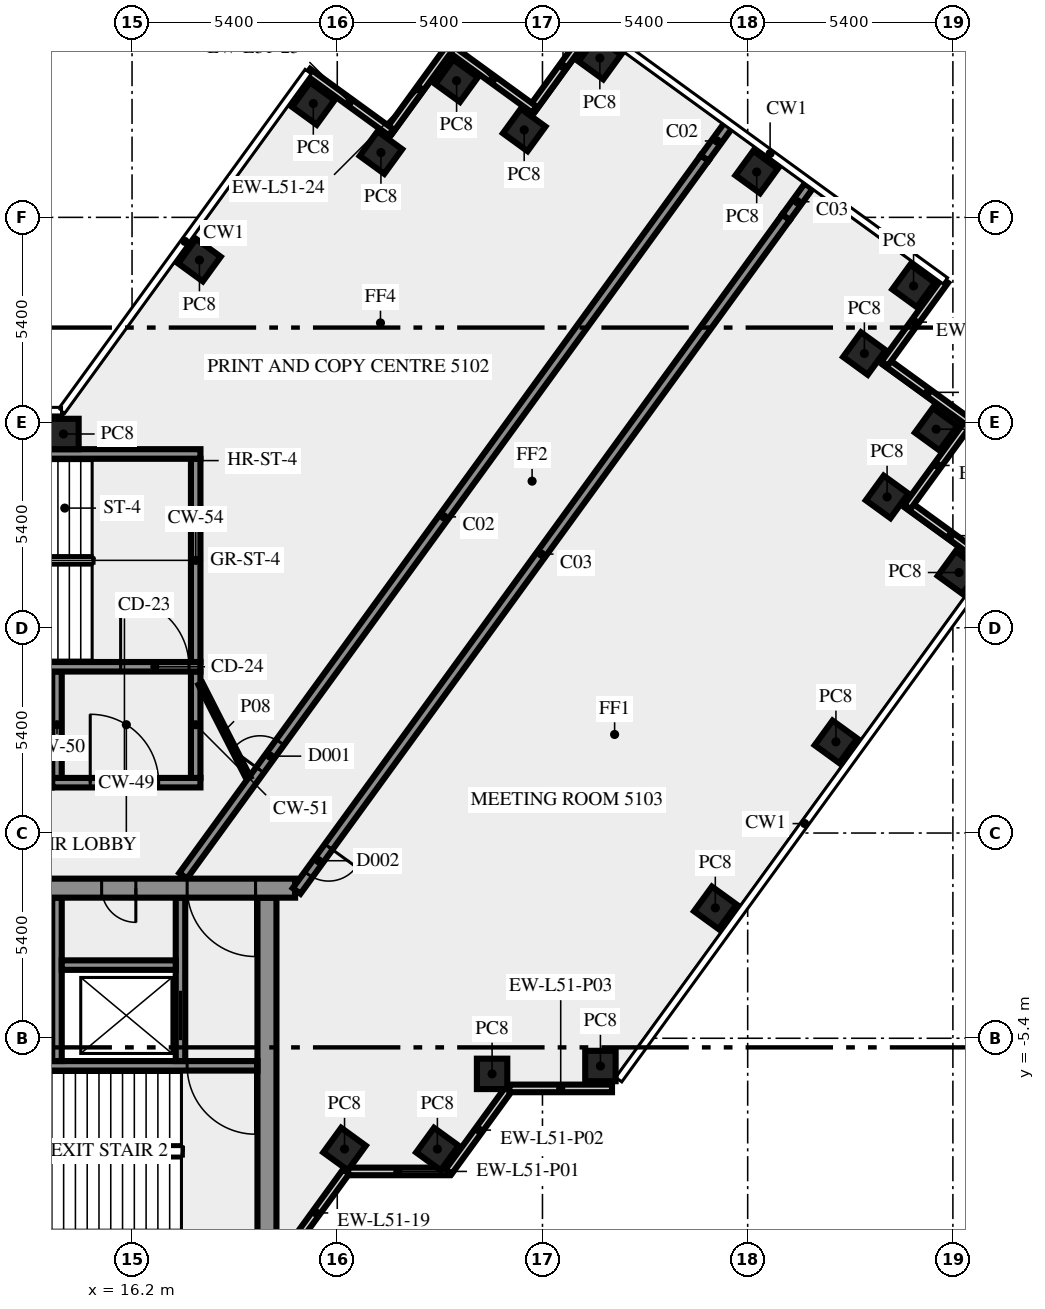
"""IFC4 building model, lengths in metres.
Left out: names, types, materials, properties, quantities, classifications, styles, units other than length and angle.
Written with IfcOpenShell. Run it as: python <this file> out.ifc"""

import sys

from ifc_helpers import new_model, si_unit, direction, frame, frame_2d, origin, origin_2d, place, context, subcontext, project, spatial, rectangle, extrude, element, fill, save


model = new_model("IFC4")
c1 = context("Model", 3, precision=1e-05, world=origin(), true_north=direction((0.0, 1.0)))
c2 = subcontext(c1, "Body", "Model", "MODEL_VIEW")
j1 = project(units=[si_unit("LENGTHUNIT", "METRE"), si_unit("PLANEANGLEUNIT", "RADIAN")], contexts=[c1])
p1 = place(None, origin())
s1 = spatial("IfcSite", under=j1, at=p1, CompositionType="ELEMENT")
p2 = place(p1, origin())
s2 = spatial("IfcBuilding", under=s1, at=p2, CompositionType="ELEMENT")
p3 = place(p2, frame((0.0, 0.0, 218.0)))
s3 = spatial("IfcBuildingStorey", under=s2, at=p3, CompositionType="ELEMENT", Elevation=218.0)
for number, where, z_axis, x_axis in (
    (1, (21.792, -8.315, 0.0), (0.0, 0.0, 1.0), (0.588, 0.809, 0.0)),
    (2, (24.235, -8.315, 0.0), (0.0, 0.0, 1.0), (0.588, 0.809, 0.0)),
    (3, (25.674, -6.337, 0.0), (0.0, 0.0, 1.0), (1.0, 0.0, 0.0)),
    (4, (28.525, -6.13, 0.0), (0.0, 0.0, 1.0), (1.0, 0.0, 0.0)),
    (5, (31.548, -1.969, 0.0), (0.0, 0.0, 1.0), (0.588, 0.809, 0.0)),
    (6, (34.722, 2.4, 0.0), (0.0, 0.0, 1.0), (0.588, 0.809, 0.0)),
    (7, (37.96, 6.855, 0.0), (0.0, 0.0, 1.0), (0.588, 0.809, 0.0)),
    (8, (36.068, 8.844, 0.0), (0.0, 0.0, 1.0), (0.588, 0.809, 0.0)),
    (9, (37.36, 10.625, 0.0), (0.0, 0.0, 1.0), (0.588, 0.809, 0.0)),
    (10, (35.471, 12.616, 0.0), (0.0, 0.0, 1.0), (-0.809, 0.588, 0.0)),
    (11, (36.765, 14.395, 0.0), (0.0, 0.0, 1.0), (-0.809, 0.588, 0.0)),
    (12, (32.637, 17.393, 0.0), (0.0, 0.0, 1.0), (-0.809, 0.588, 0.0)),
    (13, (28.51, 20.39, 0.0), (0.0, 0.0, 1.0), (-0.588, -0.809, 0.0)),
    (14, (26.519, 18.5, 0.0), (0.0, 0.0, 1.0), (-0.809, 0.588, 0.0)),
    (15, (24.74, 19.795, 0.0), (0.0, 0.0, 1.0), (-0.588, -0.809, 0.0)),
    (16, (22.749, 17.904, 0.0), (0.0, 0.0, 1.0), (-0.588, -0.809, 0.0)),
    (17, (20.97, 19.195, 0.0), (0.0, 0.0, 1.0), (-0.588, -0.809, 0.0)),
    (18, (17.974, 15.075, 0.0), (0.0, 0.0, 1.0), (-0.588, -0.809, 0.0)),
    (19, (14.395, 10.5, 0.0), (0.0, 0.0, 1.0), (-1.0, 0.0, 0.0)),
):
    element("IfcColumn", number, at=place(p3, frame(where, z_axis=z_axis, x_axis=x_axis)), inside=s3, PredefinedType="COLUMN", context=c2, shape_type="SweptSolid", body=[
        extrude(rectangle(XDim=0.8, YDim=0.8, at=origin_2d()), origin(), (0.0, 0.0, 1.0), 3.65),
    ])
p4 = place(p3, frame((21.843, -8.904, 0.0), z_axis=(0.0, 0.0, 1.0), x_axis=(1.0, 0.0, 0.0)))
e20 = element("IfcWall", 20, at=p4, inside=s3, PredefinedType="SOLIDWALL", context=c2, shape_type="SweptSolid", body=[
    extrude(rectangle(XDim=2.7, YDim=0.2, at=frame_2d((1.35, 0.0))), origin(), (0.0, 0.0, 1.0), 3.65),
])
p5 = place(p3, frame((24.533, -8.909, 0.0), z_axis=(0.0, 0.0, 1.0), x_axis=(0.587720002413, 0.809064397168, 0.0)))
e21 = element("IfcWall", 21, at=p5, inside=s3, PredefinedType="SOLIDWALL", context=c2, shape_type="SweptSolid", body=[
    extrude(rectangle(XDim=2.7, YDim=0.2, at=frame_2d((1.35, 0.0))), origin(), (0.0, 0.0, 1.0), 3.65),
])
for number, where, z_axis, x_axis in (
    (22, (26.13, -6.719, 0.0), (0.0, 0.0, 1.0), (1.0, 0.0, 0.0)),
    (23, (38.829, 7.031, 0.0), (0.0, 0.0, 1.0), (-0.809, 0.588, 0.0)),
    (24, (36.602, 8.58, 0.0), (0.0, 0.0, 1.0), (0.588, 0.809, 0.0)),
    (25, (38.231, 10.802, 0.0), (0.0, 0.0, 1.0), (-0.809, 0.588, 0.0)),
):
    element("IfcWall", number, at=place(p3, frame(where, z_axis=z_axis, x_axis=x_axis)), inside=s3, PredefinedType="SOLIDWALL", context=c2, shape_type="SweptSolid", body=[
        extrude(rectangle(XDim=2.7, YDim=0.2, at=frame_2d((1.35, 0.0))), origin(), (0.0, 0.0, 1.0), 3.65),
    ])
p6 = place(p3, frame((20.253, -11.083, 0.0), z_axis=(0.0, 0.0, 1.0), x_axis=(0.587766567315, 0.809030569476, 0.0)))
e26 = element("IfcWall", 26, at=p6, inside=s3, PredefinedType="SOLIDWALL", context=c2, shape_type="SweptSolid", body=[
    extrude(rectangle(XDim=2.688, YDim=0.2, at=frame_2d((1.344, 0.0))), origin(), (0.0, 0.0, 1.0), 3.65),
])
for number, where, z_axis, x_axis in (
    (27, (36.005, 12.352, 0.0), (0.0, 0.0, 1.0), (0.588, 0.809, 0.0)),
    (28, (28.334, 21.262, 0.0), (0.0, 0.0, 1.0), (-0.588, -0.809, 0.0)),
):
    element("IfcWall", number, at=place(p3, frame(where, z_axis=z_axis, x_axis=x_axis)), inside=s3, PredefinedType="SOLIDWALL", context=c2, shape_type="SweptSolid", body=[
        extrude(rectangle(XDim=2.7, YDim=0.2, at=frame_2d((1.35, 0.0))), origin(), (0.0, 0.0, 1.0), 3.65),
    ])
p7 = place(p3, frame((26.785, 19.036, 0.0), z_axis=(0.0, 0.0, 1.0), x_axis=(-0.809064397168, 0.587720002413, 0.0)))
e29 = element("IfcWall", 29, at=p7, inside=s3, PredefinedType="SOLIDWALL", context=c2, shape_type="SweptSolid", body=[
    extrude(rectangle(XDim=2.7, YDim=0.2, at=frame_2d((1.35, 0.0))), origin(), (0.0, 0.0, 1.0), 3.65),
])
for number, where, z_axis, x_axis in (
    (30, (24.563, 20.665, 0.0), (0.0, 0.0, 1.0), (-0.588, -0.809, 0.0)),
    (31, (23.013, 18.438, 0.0), (0.0, 0.0, 1.0), (-0.809, 0.588, 0.0)),
):
    element("IfcWall", number, at=place(p3, frame(where, z_axis=z_axis, x_axis=x_axis)), inside=s3, PredefinedType="SOLIDWALL", context=c2, shape_type="SweptSolid", body=[
        extrude(rectangle(XDim=2.7, YDim=0.2, at=frame_2d((1.35, 0.0))), origin(), (0.0, 0.0, 1.0), 3.65),
    ])
p8 = place(p3, frame((19.75, -10.5, 0.0), z_axis=(0.0, 0.0, 1.0), x_axis=(0.0, 1.0, 0.0)))
e32 = element("IfcWall", 32, at=p8, inside=s3, PredefinedType="SHEAR", context=c2, shape_type="SweptSolid", body=[
    extrude(rectangle(XDim=8.8, YDim=0.5, at=frame_2d((4.4, 0.0))), origin(), (0.0, 0.0, 1.0), 3.65),
])
p9 = place(p3, frame((19.5, -6.125, 0.0), z_axis=(0.0, 0.0, 1.0), x_axis=(-1.0, 0.0, 0.0)))
e33 = element("IfcWall", 33, at=p9, inside=s3, PredefinedType="SHEAR", context=c2, shape_type="SweptSolid", body=[
    extrude(rectangle(XDim=8.05, YDim=0.25, at=frame_2d((4.025, 0.0))), origin(), (0.0, 0.0, 1.0), 3.65),
])
p10 = place(p9, frame((0.05, 0.0, 0.0)))
e34 = element("IfcOpeningElement", 34, at=p10, cuts=e33, PredefinedType="OPENING", context=c2, shape_type="SweptSolid", body=[
    extrude(rectangle(XDim=1.8, YDim=2.1, at=frame_2d((0.9, 1.05))), frame((0.0, 0.135, 0.0), z_axis=(0.0, -1.0, 0.0), x_axis=(1.0, 0.0, 0.0)), (0.0, 0.0, 1.0), 0.27),
])
p11 = place(p3, frame((14.225, -6.0, 0.0), z_axis=(0.0, 0.0, 1.0), x_axis=(0.0, 1.0, 0.0)))
e35 = element("IfcWall", 35, at=p11, inside=s3, PredefinedType="SHEAR", context=c2, shape_type="SweptSolid", body=[
    extrude(rectangle(XDim=4.3, YDim=0.25, at=frame_2d((2.15, 0.0))), origin(), (0.0, 0.0, 1.0), 3.65),
])
p12 = place(p3, frame((17.475, -6.0, 0.0), z_axis=(0.0, 0.0, 1.0), x_axis=(0.0, 1.0, 0.0)))
e36 = element("IfcWall", 36, at=p12, inside=s3, PredefinedType="SHEAR", context=c2, shape_type="SweptSolid", body=[
    extrude(rectangle(XDim=4.3, YDim=0.25, at=frame_2d((2.15, 0.0))), origin(), (0.0, 0.0, 1.0), 3.65),
])
p13 = place(p12, frame((0.55, 0.0, 0.0)))
e37 = element("IfcOpeningElement", 37, at=p13, cuts=e36, PredefinedType="OPENING", context=c2, shape_type="SweptSolid", body=[
    extrude(rectangle(XDim=1.3, YDim=2.1, at=frame_2d((0.65, 1.05))), frame((0.0, 0.135, 0.0), z_axis=(0.0, -1.0, 0.0), x_axis=(1.0, 0.0, 0.0)), (0.0, 0.0, 1.0), 0.27),
])
p14 = place(p3, frame((14.35, -3.475, 0.0), z_axis=(0.0, 0.0, 1.0), x_axis=(1.0, 0.0, 0.0)))
e38 = element("IfcWall", 38, at=p14, inside=s3, PredefinedType="SHEAR", context=c2, shape_type="SweptSolid", body=[
    extrude(rectangle(XDim=3.0, YDim=0.25, at=frame_2d((1.5, 0.0))), origin(), (0.0, 0.0, 1.0), 3.65),
])
p15 = place(p3, frame((20.49, -1.45, 0.0), z_axis=(0.0, 0.0, 1.0), x_axis=(-1.0, 0.0, 0.0)))
e39 = element("IfcWall", 39, at=p15, inside=s3, PredefinedType="SHEAR", context=c2, shape_type="SweptSolid", body=[
    extrude(rectangle(XDim=40.98, YDim=0.5, at=frame_2d((20.49, 0.0))), origin(), (0.0, 0.0, 1.0), 3.65),
])
p16 = place(p15, frame((38.14, 0.0, 0.0)))
e40 = element("IfcOpeningElement", 40, at=p16, cuts=e39, PredefinedType="OPENING", context=c2, shape_type="SweptSolid", body=[
    extrude(rectangle(XDim=1.8, YDim=2.1, at=frame_2d((0.9, 1.05))), frame((0.0, 0.26, 0.0), z_axis=(0.0, -1.0, 0.0), x_axis=(1.0, 0.0, 0.0)), (0.0, 0.0, 1.0), 0.52),
])
p17 = place(p15, frame((36.728, 0.0, 0.0)))
e41 = element("IfcOpeningElement", 41, at=p17, cuts=e39, PredefinedType="OPENING", context=c2, shape_type="SweptSolid", body=[
    extrude(rectangle(XDim=0.8, YDim=2.1, at=frame_2d((0.4, 1.05))), frame((0.0, 0.26, 0.0), z_axis=(0.0, -1.0, 0.0), x_axis=(1.0, 0.0, 0.0)), (0.0, 0.0, 1.0), 0.52),
])
p18 = place(p15, frame((35.153, 0.0, 0.0)))
e42 = element("IfcOpeningElement", 42, at=p18, cuts=e39, PredefinedType="OPENING", context=c2, shape_type="SweptSolid", body=[
    extrude(rectangle(XDim=0.8, YDim=2.1, at=frame_2d((0.4, 1.05))), frame((0.0, 0.26, 0.0), z_axis=(0.0, -1.0, 0.0), x_axis=(1.0, 0.0, 0.0)), (0.0, 0.0, 1.0), 0.52),
])
p19 = place(p15, frame((32.94, 0.0, 0.0)))
e43 = element("IfcOpeningElement", 43, at=p19, cuts=e39, PredefinedType="OPENING", context=c2, shape_type="SweptSolid", body=[
    extrude(rectangle(XDim=0.9, YDim=2.1, at=frame_2d((0.45, 1.05))), frame((0.0, 0.26, 0.0), z_axis=(0.0, -1.0, 0.0), x_axis=(1.0, 0.0, 0.0)), (0.0, 0.0, 1.0), 0.52),
])
p20 = place(p15, frame((30.202, 0.0, 0.0)))
e44 = element("IfcOpeningElement", 44, at=p20, cuts=e39, PredefinedType="OPENING", context=c2, shape_type="SweptSolid", body=[
    extrude(rectangle(XDim=0.9, YDim=2.1, at=frame_2d((0.45, 1.05))), frame((0.0, 0.26, 0.0), z_axis=(0.0, -1.0, 0.0), x_axis=(1.0, 0.0, 0.0)), (0.0, 0.0, 1.0), 0.52),
])
p21 = place(p15, frame((27.74, 0.0, 0.0)))
e45 = element("IfcOpeningElement", 45, at=p21, cuts=e39, PredefinedType="OPENING", context=c2, shape_type="SweptSolid", body=[
    extrude(rectangle(XDim=0.9, YDim=2.1, at=frame_2d((0.45, 1.05))), frame((0.0, 0.26, 0.0), z_axis=(0.0, -1.0, 0.0), x_axis=(1.0, 0.0, 0.0)), (0.0, 0.0, 1.0), 0.52),
])
p22 = place(p15, frame((25.377, 0.0, 0.0)))
e46 = element("IfcOpeningElement", 46, at=p22, cuts=e39, PredefinedType="OPENING", context=c2, shape_type="SweptSolid", body=[
    extrude(rectangle(XDim=0.9, YDim=2.1, at=frame_2d((0.45, 1.05))), frame((0.0, 0.26, 0.0), z_axis=(0.0, -1.0, 0.0), x_axis=(1.0, 0.0, 0.0)), (0.0, 0.0, 1.0), 0.52),
])
p23 = place(p15, frame((20.74, 0.0, 0.0)))
e47 = element("IfcOpeningElement", 47, at=p23, cuts=e39, PredefinedType="OPENING", context=c2, shape_type="SweptSolid", body=[
    extrude(rectangle(XDim=2.0, YDim=2.1, at=frame_2d((1.0, 1.05))), frame((0.0, 0.26, 0.0), z_axis=(0.0, -1.0, 0.0), x_axis=(1.0, 0.0, 0.0)), (0.0, 0.0, 1.0), 0.52),
])
p24 = place(p15, frame((7.14, 0.0, 0.0)))
e48 = element("IfcOpeningElement", 48, at=p24, cuts=e39, PredefinedType="OPENING", context=c2, shape_type="SweptSolid", body=[
    extrude(rectangle(XDim=0.9, YDim=2.1, at=frame_2d((0.45, 1.05))), frame((0.0, 0.26, 0.0), z_axis=(0.0, -1.0, 0.0), x_axis=(1.0, 0.0, 0.0)), (0.0, 0.0, 1.0), 0.52),
])
p25 = place(p15, frame((4.19, 0.0, 0.0)))
e49 = element("IfcOpeningElement", 49, at=p25, cuts=e39, PredefinedType="OPENING", context=c2, shape_type="SweptSolid", body=[
    extrude(rectangle(XDim=0.9, YDim=2.1, at=frame_2d((0.45, 1.05))), frame((0.0, 0.26, 0.0), z_axis=(0.0, -1.0, 0.0), x_axis=(1.0, 0.0, 0.0)), (0.0, 0.0, 1.0), 0.52),
])
p26 = place(p15, frame((1.04, 0.0, 0.0)))
e50 = element("IfcOpeningElement", 50, at=p26, cuts=e39, PredefinedType="OPENING", context=c2, shape_type="SweptSolid", body=[
    extrude(rectangle(XDim=1.8, YDim=2.1, at=frame_2d((0.9, 1.05))), frame((0.0, 0.26, 0.0), z_axis=(0.0, -1.0, 0.0), x_axis=(1.0, 0.0, 0.0)), (0.0, 0.0, 1.0), 0.52),
])
p27 = place(p3, frame((14.1, 1.325, 0.0), z_axis=(0.0, 0.0, 1.0), x_axis=(1.0, 0.0, 0.0)))
e51 = element("IfcWall", 51, at=p27, inside=s3, PredefinedType="SHEAR", context=c2, shape_type="SweptSolid", body=[
    extrude(rectangle(XDim=3.9, YDim=0.25, at=frame_2d((1.95, 0.0))), origin(), (0.0, 0.0, 1.0), 3.65),
])
p28 = place(p27, frame((1.0, 0.0, 0.0)))
e52 = element("IfcOpeningElement", 52, at=p28, cuts=e51, PredefinedType="OPENING", context=c2, shape_type="SweptSolid", body=[
    extrude(rectangle(XDim=1.8, YDim=2.1, at=frame_2d((0.9, 1.05))), frame((0.0, 0.135, 0.0), z_axis=(0.0, -1.0, 0.0), x_axis=(1.0, 0.0, 0.0)), (0.0, 0.0, 1.0), 0.27),
])
for number, where, z_axis, x_axis in (
    (53, (14.225, 1.45, 0.0), (0.0, 0.0, 1.0), (0.0, 1.0, 0.0)),
    (54, (17.875, 1.45, 0.0), (0.0, 0.0, 1.0), (0.0, 1.0, 0.0)),
):
    element("IfcWall", number, at=place(p3, frame(where, z_axis=z_axis, x_axis=x_axis)), inside=s3, PredefinedType="SHEAR", context=c2, shape_type="SweptSolid", body=[
        extrude(rectangle(XDim=2.8, YDim=0.25, at=frame_2d((1.4, 0.0))), origin(), (0.0, 0.0, 1.0), 3.65),
    ])
p29 = place(p3, frame((7.5, 4.375, 0.0), z_axis=(0.0, 0.0, 1.0), x_axis=(1.0, 0.0, 0.0)))
e55 = element("IfcWall", 55, at=p29, inside=s3, PredefinedType="SHEAR", context=c2, shape_type="SweptSolid", body=[
    extrude(rectangle(XDim=10.5, YDim=0.25, at=frame_2d((5.25, 0.0))), origin(), (0.0, 0.0, 1.0), 3.65),
])
p30 = place(p29, frame((8.4, 0.0, 0.0)))
e56 = element("IfcOpeningElement", 56, at=p30, cuts=e55, PredefinedType="OPENING", context=c2, shape_type="SweptSolid", body=[
    extrude(rectangle(XDim=1.8, YDim=2.1, at=frame_2d((0.9, 1.05))), frame((0.0, 0.135, 0.0), z_axis=(0.0, -1.0, 0.0), x_axis=(1.0, 0.0, 0.0)), (0.0, 0.0, 1.0), 0.27),
])
p31 = place(p3, frame((17.875, 4.5, 0.0), z_axis=(0.0, 0.0, 1.0), x_axis=(0.0, 1.0, 0.0)))
e57 = element("IfcWall", 57, at=p31, inside=s3, PredefinedType="SHEAR", context=c2, shape_type="SweptSolid", body=[
    extrude(rectangle(XDim=5.35, YDim=0.25, at=frame_2d((2.675, 0.0))), origin(), (0.0, 0.0, 1.0), 3.65),
])
p32 = place(p3, frame((7.5, 9.975, 0.0), z_axis=(0.0, 0.0, 1.0), x_axis=(1.0, 0.0, 0.0)))
e58 = element("IfcWall", 58, at=p32, inside=s3, PredefinedType="SHEAR", context=c2, shape_type="SweptSolid", body=[
    extrude(rectangle(XDim=10.5, YDim=0.25, at=frame_2d((5.25, 0.0))), origin(), (0.0, 0.0, 1.0), 3.65),
])
p33 = place(p32, frame((2.0, 0.0, 1.0)))
e59 = element("IfcOpeningElement", 59, at=p33, cuts=e58, PredefinedType="OPENING", context=c2, shape_type="SweptSolid", body=[
    extrude(rectangle(XDim=1.2, YDim=1.2, at=frame_2d((0.6, 0.6))), frame((0.0, 0.135, 0.0), z_axis=(0.0, -1.0, 0.0), x_axis=(1.0, 0.0, 0.0)), (0.0, 0.0, 1.0), 0.27),
])
p34 = place(p3, frame((17.545, -1.125, 0.0), z_axis=(0.0, 0.0, 1.0), x_axis=(0.587787966774, 0.809015022181, 0.0)))
e60 = element("IfcWall", 60, at=p34, inside=s3, PredefinedType="SOLIDWALL", context=c2, shape_type="SweptSolid", body=[
    extrude(rectangle(XDim=23.345, YDim=0.25, at=frame_2d((11.672, 0.0))), origin(), (0.0, 0.0, 1.0), 3.65),
])
p35 = place(p34, frame((3.441, 0.0, 0.0)))
e61 = element("IfcOpeningElement", 61, at=p35, cuts=e60, PredefinedType="OPENING", context=c2, shape_type="SweptSolid", body=[
    extrude(rectangle(XDim=0.9, YDim=2.1, at=frame_2d((0.45, 1.05))), frame((0.0, 0.135, 0.0), z_axis=(0.0, -1.0, 0.0), x_axis=(1.0, 0.0, 0.0)), (0.0, 0.0, 1.0), 0.27),
])
p36 = place(p3, frame((33.41, 16.203, 0.0), z_axis=(0.0, 0.0, 1.0), x_axis=(-0.587786711753, -0.809015934013, 0.0)))
e62 = element("IfcWall", 62, at=p36, inside=s3, PredefinedType="SOLIDWALL", context=c2, shape_type="SweptSolid", body=[
    extrude(rectangle(XDim=21.911, YDim=0.25, at=frame_2d((10.956, 0.0))), origin(), (0.0, 0.0, 1.0), 3.65),
])
p37 = place(p36, frame((20.479, 0.0, 0.0)))
e63 = element("IfcOpeningElement", 63, at=p37, cuts=e62, PredefinedType="OPENING", context=c2, shape_type="SweptSolid", body=[
    extrude(rectangle(XDim=0.9, YDim=2.1, at=frame_2d((0.45, 1.05))), frame((0.0, 0.135, 0.0), z_axis=(0.0, -1.0, 0.0), x_axis=(1.0, 0.0, 0.0)), (0.0, 0.0, 1.0), 0.27),
])
p38 = place(p3, frame((18.0, 3.925, 0.0), z_axis=(0.0, 0.0, 1.0), x_axis=(0.453950796792, -0.891026752736, 0.0)))
e64 = element("IfcWall", 64, at=p38, inside=s3, PredefinedType="PARTITIONING", context=c2, shape_type="SweptSolid", body=[
    extrude(rectangle(XDim=2.778, YDim=0.12, at=frame_2d((1.389, 0.0))), origin(), (0.0, 0.0, 1.0), 3.65),
])
p39 = place(p3, frame((31.267, 17.762, 0.0), z_axis=(0.0, 0.0, 1.0), x_axis=(0.587778942742, 0.809021578494, 0.0)))
e65 = element("IfcWall", 65, at=p39, inside=s3, PredefinedType="SOLIDWALL", context=c2, shape_type="SweptSolid", body=[
    extrude(rectangle(XDim=1.109, YDim=0.25, at=frame_2d((0.555, 0.0))), origin(), (0.0, 0.0, 1.0), 2.85),
])
p40 = place(p3, frame((33.41, 16.203, 0.0), z_axis=(0.0, 0.0, 1.0), x_axis=(0.587696850957, 0.809081214326, 0.0)))
e66 = element("IfcWall", 66, at=p40, inside=s3, PredefinedType="SOLIDWALL", context=c2, shape_type="SweptSolid", body=[
    extrude(rectangle(XDim=1.009, YDim=0.25, at=frame_2d((0.504, 0.0))), origin(), (0.0, 0.0, 1.0), 2.85),
])
p41 = place(p10, origin())
e67 = element("IfcDoor", 67, at=p41, inside=s3, OperationType="DOUBLE_DOOR_SINGLE_SWING", PredefinedType="DOOR", context=c2, shape_type="SweptSolid", body=[
    extrude(rectangle(XDim=1.8, YDim=2.1, at=frame_2d((0.9, 1.05))), frame((0.0, 0.025, 0.0), z_axis=(0.0, -1.0, 0.0), x_axis=(1.0, 0.0, 0.0)), (0.0, 0.0, 1.0), 0.05),
])
fill(e34, e67)
p42 = place(p13, origin())
e68 = element("IfcDoor", 68, at=p42, inside=s3, OperationType="DOUBLE_DOOR_SLIDING", PredefinedType="DOOR", context=c2, shape_type="SweptSolid", body=[
    extrude(rectangle(XDim=1.3, YDim=2.1, at=frame_2d((0.65, 1.05))), frame((0.0, 0.025, 0.0), z_axis=(0.0, -1.0, 0.0), x_axis=(1.0, 0.0, 0.0)), (0.0, 0.0, 1.0), 0.05),
])
fill(e37, e68)
p43 = place(p25, origin())
e69 = element("IfcDoor", 69, at=p43, inside=s3, OperationType="SINGLE_SWING_LEFT", PredefinedType="DOOR", context=c2, shape_type="SweptSolid", body=[
    extrude(rectangle(XDim=0.9, YDim=2.1, at=frame_2d((0.45, 1.05))), frame((0.0, 0.025, 0.0), z_axis=(0.0, -1.0, 0.0), x_axis=(1.0, 0.0, 0.0)), (0.0, 0.0, 1.0), 0.05),
])
fill(e49, e69)
p44 = place(p26, origin())
e70 = element("IfcDoor", 70, at=p44, inside=s3, OperationType="DOUBLE_DOOR_SINGLE_SWING", PredefinedType="DOOR", context=c2, shape_type="SweptSolid", body=[
    extrude(rectangle(XDim=1.8, YDim=2.1, at=frame_2d((0.9, 1.05))), frame((0.0, 0.025, 0.0), z_axis=(0.0, -1.0, 0.0), x_axis=(1.0, 0.0, 0.0)), (0.0, 0.0, 1.0), 0.05),
])
fill(e50, e70)
p45 = place(p28, origin())
e71 = element("IfcDoor", 71, at=p45, inside=s3, OperationType="DOUBLE_DOOR_SINGLE_SWING", PredefinedType="DOOR", context=c2, shape_type="SweptSolid", body=[
    extrude(rectangle(XDim=1.8, YDim=2.1, at=frame_2d((0.9, 1.05))), frame((0.0, 0.025, 0.0), z_axis=(0.0, -1.0, 0.0), x_axis=(1.0, 0.0, 0.0)), (0.0, 0.0, 1.0), 0.05),
])
fill(e52, e71)
p46 = place(p30, origin())
e72 = element("IfcDoor", 72, at=p46, inside=s3, OperationType="DOUBLE_DOOR_SINGLE_SWING", PredefinedType="DOOR", context=c2, shape_type="SweptSolid", body=[
    extrude(rectangle(XDim=1.8, YDim=2.1, at=frame_2d((0.9, 1.05))), frame((0.0, 0.025, 0.0), z_axis=(0.0, -1.0, 0.0), x_axis=(1.0, 0.0, 0.0)), (0.0, 0.0, 1.0), 0.05),
])
fill(e56, e72)
p47 = place(p37, origin())
e73 = element("IfcDoor", 73, at=p47, inside=s3, OperationType="SINGLE_SWING_RIGHT", PredefinedType="DOOR", context=c2, shape_type="SweptSolid", body=[
    extrude(rectangle(XDim=0.9, YDim=2.1, at=frame_2d((0.45, 1.05))), frame((0.0, 0.025, 0.0), z_axis=(0.0, -1.0, 0.0), x_axis=(1.0, 0.0, 0.0)), (0.0, 0.0, 1.0), 0.05),
])
fill(e63, e73)
p48 = place(p35, origin())
e74 = element("IfcDoor", 74, at=p48, inside=s3, OperationType="SINGLE_SWING_LEFT", PredefinedType="DOOR", context=c2, shape_type="SweptSolid", body=[
    extrude(rectangle(XDim=0.9, YDim=2.1, at=frame_2d((0.45, 1.05))), frame((0.0, 0.025, 0.0), z_axis=(0.0, -1.0, 0.0), x_axis=(1.0, 0.0, 0.0)), (0.0, 0.0, 1.0), 0.05),
])
fill(e61, e74)
save(model, sys.argv[1])
